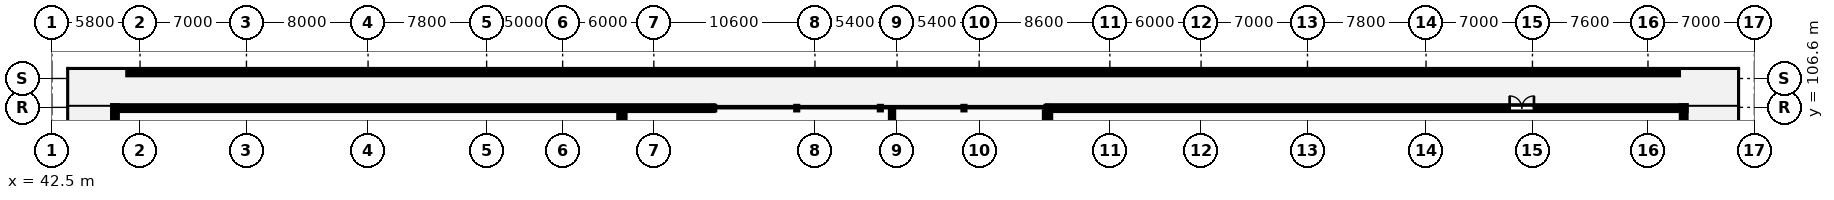
"""IFC4 building model, lengths in metres.
Left out: names, types, materials, properties, quantities, classifications, styles, units other than length and angle.
Written with IfcOpenShell. Run it as: python <this file> out.ifc"""

import sys

from ifc_helpers import new_model, si_unit, direction, frame, frame_2d, origin, origin_2d, place, context, subcontext, project, spatial, rectangle, i_section, extrude, element, fill, save


model = new_model("IFC4")
c1 = context("Model", 3, precision=1e-05, world=origin(), true_north=direction((0.0, 1.0)))
c2 = subcontext(c1, "Body", "Model", "MODEL_VIEW")
j1 = project(units=[si_unit("LENGTHUNIT", "METRE"), si_unit("PLANEANGLEUNIT", "RADIAN")], contexts=[c1])
p1 = place(None, origin())
s1 = spatial("IfcSite", under=j1, at=p1, CompositionType="ELEMENT")
p2 = place(p1, origin())
s2 = spatial("IfcBuilding", under=s1, at=p2, CompositionType="ELEMENT")
p3 = place(p2, frame((0.0, 0.0, 5.4)))
s3 = spatial("IfcBuildingStorey", under=s2, at=p3, CompositionType="ELEMENT", Elevation=5.4)
for number, where, z_axis, x_axis in (
    (1, (80.0, 106.1, 0.0), (0.0, 0.0, 1.0), (1.0, 0.0, 0.0)),
    (2, (108.0, 106.1, 0.0), (0.0, 0.0, 1.0), (1.0, 0.0, 0.0)),
):
    element("IfcColumn", number, at=place(p3, frame(where, z_axis=z_axis, x_axis=x_axis)), inside=s3, PredefinedType="COLUMN", context=c2, shape_type="SweptSolid", body=[
        extrude(i_section(OverallWidth=0.399, OverallDepth=0.394, WebThickness=0.023, FlangeThickness=0.037, FilletRadius=0.015, at=origin_2d()), origin(), (0.0, 0.0, 1.0), 4.36),
    ])
p4 = place(p3, frame((150.0, 106.55, 0.0), z_axis=(0.0, 0.0, 1.0), x_axis=(-1.0, 0.0, 0.0)))
e3 = element("IfcWall", 3, at=p4, inside=s3, PredefinedType="STANDARD", context=c2, shape_type="SweptSolid", body=[
    extrude(rectangle(XDim=42.0, YDim=0.3, at=frame_2d((21.0, 0.0))), origin(), (0.0, 0.0, 1.0), 4.3),
])
p5 = place(p4, frame((10.0, 0.0, 0.0)))
e4 = element("IfcOpeningElement", 4, at=p5, cuts=e3, PredefinedType="OPENING", context=c2, shape_type="SweptSolid", body=[
    extrude(rectangle(XDim=1.6, YDim=2.2, at=frame_2d((0.8, 1.1))), frame((0.0, 0.16, 0.0), z_axis=(0.0, -1.0, 0.0), x_axis=(1.0, 0.0, 0.0)), (0.0, 0.0, 1.0), 0.32),
])
p6 = place(p3, frame((86.0, 106.55, 0.0), z_axis=(0.0, 0.0, 1.0), x_axis=(-1.0, 0.0, 0.0)))
e5 = element("IfcWall", 5, at=p6, inside=s3, PredefinedType="STANDARD", context=c2, shape_type="SweptSolid", body=[
    extrude(rectangle(XDim=39.5, YDim=0.3, at=frame_2d((19.75, 0.0))), origin(), (0.0, 0.0, 1.0), 4.3),
])
p7 = place(p3, frame((46.65, 106.7, 0.0), z_axis=(0.0, 0.0, 1.0), x_axis=(0.0, -1.0, 0.0)))
e6 = element("IfcWall", 6, at=p7, inside=s3, PredefinedType="STANDARD", context=c2, shape_type="SweptSolid", body=[
    extrude(rectangle(XDim=130.2, YDim=0.3, at=frame_2d((65.1, 0.0))), origin(), (0.0, 0.0, 1.0), 4.3),
])
p8 = place(p7, frame((12.0, 0.0, 0.0)))
e7 = element("IfcOpeningElement", 7, at=p8, cuts=e6, PredefinedType="OPENING", context=c2, shape_type="SweptSolid", body=[
    extrude(rectangle(XDim=1.6, YDim=2.2, at=frame_2d((0.8, 1.1))), frame((0.0, 0.16, 0.0), z_axis=(0.0, -1.0, 0.0), x_axis=(1.0, 0.0, 0.0)), (0.0, 0.0, 1.0), 0.32),
])
p9 = place(p3, frame((149.85, -23.5, 0.0), z_axis=(0.0, 0.0, 1.0), x_axis=(0.0, 1.0, 0.0)))
e8 = element("IfcWall", 8, at=p9, inside=s3, PredefinedType="STANDARD", context=c2, shape_type="SweptSolid", body=[
    extrude(rectangle(XDim=130.2, YDim=0.3, at=frame_2d((65.1, 0.0))), origin(), (0.0, 0.0, 1.0), 4.3),
])
p10 = place(p9, frame((20.0, 0.0, 0.0)))
e9 = element("IfcOpeningElement", 9, at=p10, cuts=e8, PredefinedType="OPENING", context=c2, shape_type="SweptSolid", body=[
    extrude(rectangle(XDim=1.6, YDim=2.2, at=frame_2d((0.8, 1.1))), frame((0.0, 0.16, 0.0), z_axis=(0.0, -1.0, 0.0), x_axis=(1.0, 0.0, 0.0)), (0.0, 0.0, 1.0), 0.32),
])
p11 = place(p3, frame((149.5, 108.85, 0.0), z_axis=(0.0, 0.0, 1.0), x_axis=(-1.0, 0.0, 0.0)))
e10 = element("IfcWall", 10, at=p11, inside=s3, PredefinedType="PARAPET", context=c2, shape_type="SweptSolid", body=[
    extrude(rectangle(XDim=102.0, YDim=0.2, at=frame_2d((51.0, 0.0))), origin(), (0.0, 0.0, 1.0), 0.65),
])
p12 = place(p3, frame((97.77, 67.4, 0.0), z_axis=(0.0, 0.0, 1.0), x_axis=(0.0, 1.0, 0.0)))
e11 = element("IfcWall", 11, at=p12, inside=s3, PredefinedType="PARTITIONING", context=c2, shape_type="SweptSolid", body=[
    extrude(rectangle(XDim=39.12, YDim=0.2, at=frame_2d((19.56, 0.0))), origin(), (0.0, 0.0, 1.0), 4.3),
])
p13 = place(p12, frame((9.5, 0.0, 0.0)))
e12 = element("IfcOpeningElement", 12, at=p13, cuts=e11, PredefinedType="OPENING", context=c2, shape_type="SweptSolid", body=[
    extrude(rectangle(XDim=1.22, YDim=2.18, at=frame_2d((0.61, 1.09))), frame((0.0, 0.11, 0.0), z_axis=(0.0, -1.0, 0.0), x_axis=(1.0, 0.0, 0.0)), (0.0, 0.0, 1.0), 0.22),
])
p14 = place(p5, frame((1.6, 0.0, 0.0), z_axis=(0.0, 0.0, 1.0), x_axis=(-1.0, 0.0, 0.0)))
e13 = element("IfcDoor", 13, at=p14, inside=s3, OperationType="DOUBLE_DOOR_SINGLE_SWING", PredefinedType="DOOR", context=c2, shape_type="SweptSolid", body=[
    extrude(rectangle(XDim=1.6, YDim=2.2, at=frame_2d((0.8, 1.1))), frame((0.0, 0.025, 0.0), z_axis=(0.0, -1.0, 0.0), x_axis=(1.0, 0.0, 0.0)), (0.0, 0.0, 1.0), 0.05),
])
fill(e4, e13)
save(model, sys.argv[1])
